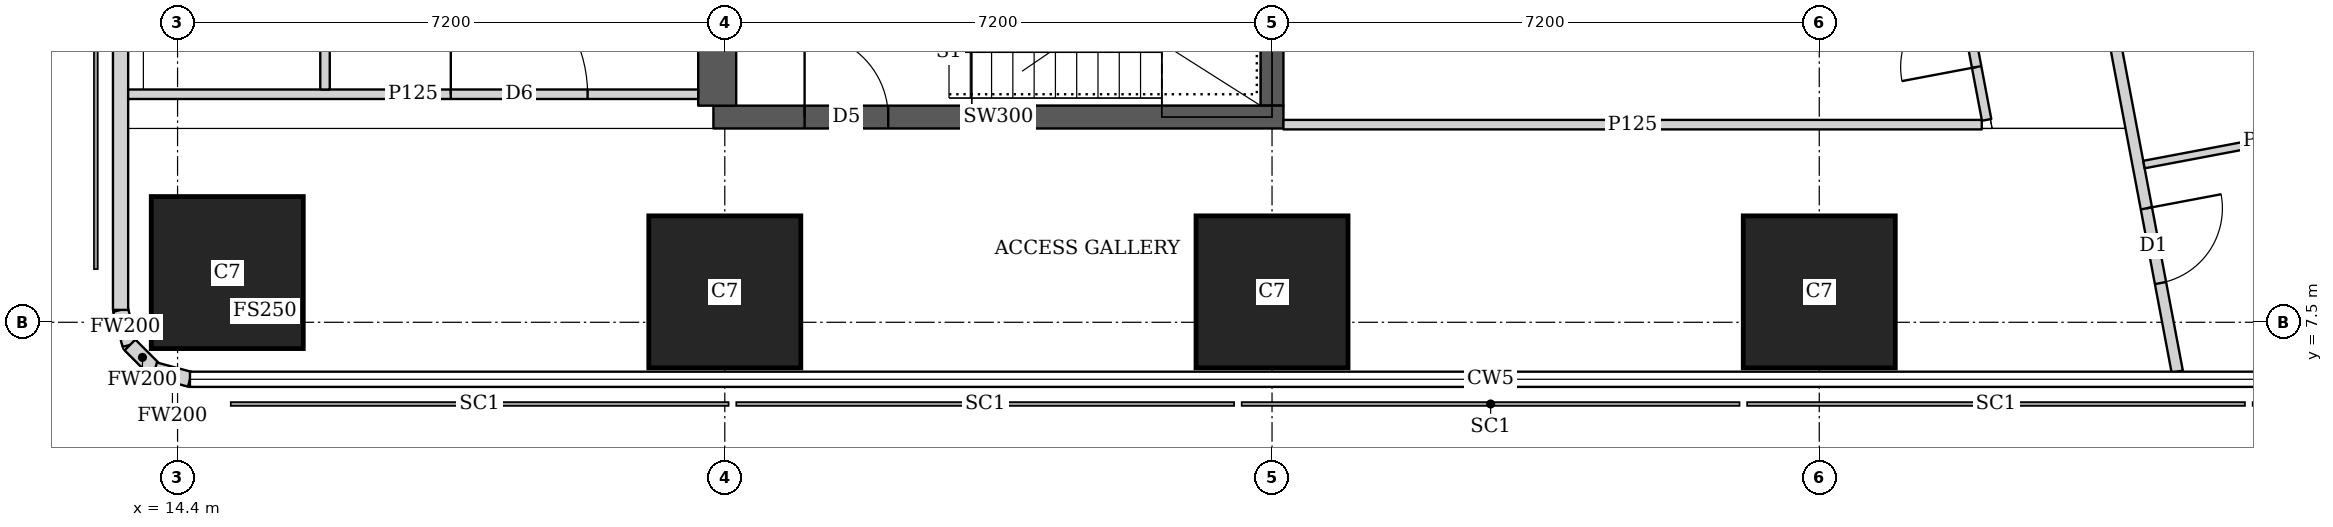
"""IFC4 building model, lengths in metres.
Left out: names, types, materials, properties, quantities, classifications, styles, units other than length and angle.
Written with IfcOpenShell. Run it as: python <this file> out.ifc"""

import sys

from ifc_helpers import new_model, si_unit, direction, frame, frame_2d, origin, origin_2d, place, context, subcontext, project, spatial, rectangle, extrude, element, fill, save


model = new_model("IFC4")
c1 = context("Model", 3, precision=1e-05, world=origin(), true_north=direction((0.0, 1.0)))
c2 = subcontext(c1, "Body", "Model", "MODEL_VIEW")
j1 = project(units=[si_unit("LENGTHUNIT", "METRE"), si_unit("PLANEANGLEUNIT", "RADIAN")], contexts=[c1])
p1 = place(None, origin())
s1 = spatial("IfcSite", under=j1, at=p1, CompositionType="ELEMENT")
p2 = place(p1, origin())
s2 = spatial("IfcBuilding", under=s1, at=p2, CompositionType="ELEMENT")
p3 = place(p2, frame((0.0, 0.0, 289.1)))
s3 = spatial("IfcBuildingStorey", under=s2, at=p3, CompositionType="ELEMENT", Elevation=289.1)
for number, where, z_axis, x_axis in (
    (1, (15.054, 8.154, 0.0), (0.0, 0.0, 1.0), (1.0, 0.0, 0.0)),
    (2, (21.6, 7.9, 0.0), (0.0, 0.0, 1.0), (1.0, 0.0, 0.0)),
    (3, (28.8, 7.9, 0.0), (0.0, 0.0, 1.0), (1.0, 0.0, 0.0)),
    (4, (36.0, 7.9, 0.0), (0.0, 0.0, 1.0), (1.0, 0.0, 0.0)),
):
    element("IfcColumn", number, at=place(p3, frame(where, z_axis=z_axis, x_axis=x_axis)), inside=s3, PredefinedType="COLUMN", context=c2, shape_type="SweptSolid", body=[
        extrude(rectangle(XDim=2.0, YDim=2.0, at=origin_2d()), origin(), (0.0, 0.0, 1.0), 3.75),
    ])
p4 = place(p3, frame((21.45, 10.2, 0.0), z_axis=(0.0, 0.0, 1.0), x_axis=(1.0, 0.0, 0.0)))
e5 = element("IfcWall", 5, at=p4, inside=s3, PredefinedType="SHEAR", context=c2, shape_type="SweptSolid", body=[
    extrude(rectangle(XDim=7.5, YDim=0.3, at=frame_2d((3.75, 0.0))), origin(), (0.0, 0.0, 1.0), 3.75),
])
p5 = place(p4, frame((1.2, 0.0, 0.0)))
e6 = element("IfcOpeningElement", 6, at=p5, cuts=e5, PredefinedType="OPENING", context=c2, shape_type="SweptSolid", body=[
    extrude(rectangle(XDim=1.1, YDim=2.1, at=frame_2d((0.55, 1.05))), frame((0.0, 0.16, 0.0), z_axis=(0.0, -1.0, 0.0), x_axis=(1.0, 0.0, 0.0)), (0.0, 0.0, 1.0), 0.32),
])
p6 = place(p3, frame((21.5, 10.35, 0.0), z_axis=(0.0, 0.0, 1.0), x_axis=(0.0, 1.0, 0.0)))
e7 = element("IfcWall", 7, at=p6, inside=s3, PredefinedType="SHEAR", context=c2, shape_type="SweptSolid", body=[
    extrude(rectangle(XDim=4.2, YDim=0.5, at=frame_2d((2.1, 0.0))), origin(), (0.0, 0.0, 1.0), 3.75),
])
p7 = place(p3, frame((28.8, 10.35, 0.0), z_axis=(0.0, 0.0, 1.0), x_axis=(0.0, 1.0, 0.0)))
e8 = element("IfcWall", 8, at=p7, inside=s3, PredefinedType="SHEAR", context=c2, shape_type="SweptSolid", body=[
    extrude(rectangle(XDim=4.2, YDim=0.3, at=frame_2d((2.1, 0.0))), origin(), (0.0, 0.0, 1.0), 3.75),
])
p8 = place(p3, frame((13.65, 43.037, 0.0), z_axis=(0.0, 0.0, 1.0), x_axis=(0.0, -1.0, 0.0)))
e9 = element("IfcWall", 9, at=p8, inside=s3, PredefinedType="SOLIDWALL", context=c2, shape_type="SweptSolid", body=[
    extrude(rectangle(XDim=35.374, YDim=0.2, at=frame_2d((17.687, 0.0))), origin(), (0.0, 0.0, 1.0), 3.5),
])
p9 = place(p3, frame((13.65, 7.663, 0.0), z_axis=(0.0, 0.0, 1.0), x_axis=(0.259698463175, -0.965689757751, 0.0)))
e10 = element("IfcWall", 10, at=p9, inside=s3, PredefinedType="SOLIDWALL", context=c2, shape_type="SweptSolid", body=[
    extrude(rectangle(XDim=0.478, YDim=0.2, at=frame_2d((0.239, 0.0))), origin(), (0.0, 0.0, 1.0), 3.5),
])
p10 = place(p3, frame((13.774, 7.202, 0.0), z_axis=(0.0, 0.0, 1.0), x_axis=(0.707369890659, -0.706843573776, 0.0)))
e11 = element("IfcWall", 11, at=p10, inside=s3, PredefinedType="SOLIDWALL", context=c2, shape_type="SweptSolid", body=[
    extrude(rectangle(XDim=0.464, YDim=0.2, at=frame_2d((0.232, 0.0))), origin(), (0.0, 0.0, 1.0), 3.5),
])
p11 = place(p3, frame((14.102, 6.874, 0.0), z_axis=(0.0, 0.0, 1.0), x_axis=(0.965655254015, -0.259826731483, 0.0)))
e12 = element("IfcWall", 12, at=p11, inside=s3, PredefinedType="SOLIDWALL", context=c2, shape_type="SweptSolid", body=[
    extrude(rectangle(XDim=0.477, YDim=0.2, at=frame_2d((0.239, 0.0))), origin(), (0.0, 0.0, 1.0), 3.5),
])
p12 = place(p3, frame((34.036, 42.186, 0.0), z_axis=(0.0, 0.0, 1.0), x_axis=(0.185593518645, -0.9826266055, 0.0)))
e13 = element("IfcWall", 13, at=p12, inside=s3, PredefinedType="SOLIDWALL", context=c2, shape_type="SweptSolid", body=[
    extrude(rectangle(XDim=35.961, YDim=0.15, at=frame_2d((17.98, 0.0))), origin(), (0.0, 0.0, 1.0), 2.5),
])
p13 = place(p12, frame((19.345, 0.0, 0.0)))
e14 = element("IfcOpeningElement", 14, at=p13, cuts=e13, PredefinedType="OPENING", context=c2, shape_type="SweptSolid", body=[
    extrude(rectangle(XDim=1.0, YDim=2.1, at=frame_2d((0.5, 1.05))), frame((0.0, 0.085, 0.0), z_axis=(0.0, -1.0, 0.0), x_axis=(1.0, 0.0, 0.0)), (0.0, 0.0, 1.0), 0.17),
])
p14 = place(p12, frame((33.774, 0.0, 0.0)))
e15 = element("IfcOpeningElement", 15, at=p14, cuts=e13, PredefinedType="OPENING", context=c2, shape_type="SweptSolid", body=[
    extrude(rectangle(XDim=1.0, YDim=2.1, at=frame_2d((0.5, 1.05))), frame((0.0, 0.085, 0.0), z_axis=(0.0, -1.0, 0.0), x_axis=(1.0, 0.0, 0.0)), (0.0, 0.0, 1.0), 0.17),
])
p15 = place(p3, frame((43.539, 10.192, 0.0), z_axis=(0.0, 0.0, 1.0), x_axis=(-0.982633623707, -0.185556356831, 0.0)))
e16 = element("IfcWall", 16, at=p15, inside=s3, PredefinedType="PARTITIONING", context=c2, shape_type="SweptSolid", body=[
    extrude(rectangle(XDim=3.325, YDim=0.1, at=frame_2d((1.663, 0.0))), origin(), (0.0, 0.0, 1.0), 3.5),
])
p16 = place(p3, frame((13.75, 10.5, 0.0), z_axis=(0.0, 0.0, 1.0), x_axis=(1.0, 0.0, 0.0)))
e17 = element("IfcWall", 17, at=p16, inside=s3, PredefinedType="PARTITIONING", context=c2, shape_type="SweptSolid", body=[
    extrude(rectangle(XDim=7.5, YDim=0.125, at=frame_2d((3.75, 0.0))), origin(), (0.0, 0.0, 1.0), 3.5),
])
p17 = place(p16, frame((4.245, 0.0, 0.0)))
e18 = element("IfcOpeningElement", 18, at=p17, cuts=e17, PredefinedType="OPENING", context=c2, shape_type="SweptSolid", body=[
    extrude(rectangle(XDim=1.8, YDim=2.1, at=frame_2d((0.9, 1.05))), frame((0.0, 0.073, 0.0), z_axis=(0.0, -1.0, 0.0), x_axis=(1.0, 0.0, 0.0)), (0.0, 0.0, 1.0), 0.145),
])
p18 = place(p3, frame((16.34, 10.562, 0.0), z_axis=(0.0, 0.0, 1.0), x_axis=(0.0, 1.0, 0.0)))
e19 = element("IfcWall", 19, at=p18, inside=s3, PredefinedType="PARTITIONING", context=c2, shape_type="SweptSolid", body=[
    extrude(rectangle(XDim=3.988, YDim=0.125, at=frame_2d((1.994, 0.0))), origin(), (0.0, 0.0, 1.0), 3.5),
])
p19 = place(p18, frame((1.438, 0.0, 0.0)))
e20 = element("IfcOpeningElement", 20, at=p19, cuts=e19, PredefinedType="OPENING", context=c2, shape_type="SweptSolid", body=[
    extrude(rectangle(XDim=1.0, YDim=2.1, at=frame_2d((0.5, 1.05))), frame((0.0, 0.073, 0.0), z_axis=(0.0, -1.0, 0.0), x_axis=(1.0, 0.0, 0.0)), (0.0, 0.0, 1.0), 0.145),
])
p20 = place(p3, frame((28.95, 10.1, 0.0), z_axis=(0.0, 0.0, 1.0), x_axis=(1.0, 0.0, 0.0)))
e21 = element("IfcWall", 21, at=p20, inside=s3, PredefinedType="PARTITIONING", context=c2, shape_type="SweptSolid", body=[
    extrude(rectangle(XDim=9.188, YDim=0.125, at=frame_2d((4.594, 0.0))), origin(), (0.0, 0.0, 1.0), 3.5),
])
p21 = place(p3, frame((38.202, 10.163, 0.0), z_axis=(0.0, 0.0, 1.0), x_axis=(-0.185641892853, 0.982617467593, 0.0)))
e22 = element("IfcWall", 22, at=p21, inside=s3, PredefinedType="PARTITIONING", context=c2, shape_type="SweptSolid", body=[
    extrude(rectangle(XDim=4.922, YDim=0.125, at=frame_2d((2.461, 0.0))), origin(), (0.0, 0.0, 1.0), 3.5),
])
p22 = place(p21, frame((0.708, 0.0, 0.0)))
e23 = element("IfcOpeningElement", 23, at=p22, cuts=e22, PredefinedType="OPENING", context=c2, shape_type="SweptSolid", body=[
    extrude(rectangle(XDim=1.0, YDim=2.1, at=frame_2d((0.5, 1.05))), frame((0.0, 0.073, 0.0), z_axis=(0.0, -1.0, 0.0), x_axis=(1.0, 0.0, 0.0)), (0.0, 0.0, 1.0), 0.145),
])
p23 = place(p14, origin())
e24 = element("IfcDoor", 24, at=p23, inside=s3, OperationType="SINGLE_SWING_LEFT", PredefinedType="DOOR", context=c2, shape_type="SweptSolid", body=[
    extrude(rectangle(XDim=1.0, YDim=2.1, at=frame_2d((0.5, 1.05))), frame((0.0, 0.025, 0.0), z_axis=(0.0, -1.0, 0.0), x_axis=(1.0, 0.0, 0.0)), (0.0, 0.0, 1.0), 0.05),
])
fill(e15, e24)
p24 = place(p17, origin())
e25 = element("IfcDoor", 25, at=p24, inside=s3, OperationType="DOUBLE_DOOR_SINGLE_SWING", PredefinedType="DOOR", context=c2, shape_type="SweptSolid", body=[
    extrude(rectangle(XDim=1.8, YDim=2.1, at=frame_2d((0.9, 1.05))), frame((0.0, 0.025, 0.0), z_axis=(0.0, -1.0, 0.0), x_axis=(1.0, 0.0, 0.0)), (0.0, 0.0, 1.0), 0.05),
])
fill(e18, e25)
p25 = place(p22, origin())
e26 = element("IfcDoor", 26, at=p25, inside=s3, OperationType="SINGLE_SWING_LEFT", PredefinedType="DOOR", context=c2, shape_type="SweptSolid", body=[
    extrude(rectangle(XDim=1.0, YDim=2.1, at=frame_2d((0.5, 1.05))), frame((0.0, 0.025, 0.0), z_axis=(0.0, -1.0, 0.0), x_axis=(1.0, 0.0, 0.0)), (0.0, 0.0, 1.0), 0.05),
])
fill(e23, e26)
p26 = place(p5, origin())
e27 = element("IfcDoor", 27, at=p26, inside=s3, OperationType="SINGLE_SWING_LEFT", PredefinedType="DOOR", context=c2, shape_type="SweptSolid", body=[
    extrude(rectangle(XDim=1.1, YDim=2.1, at=frame_2d((0.55, 1.05))), frame((0.0, 0.025, 0.0), z_axis=(0.0, -1.0, 0.0), x_axis=(1.0, 0.0, 0.0)), (0.0, 0.0, 1.0), 0.05),
])
fill(e6, e27)
save(model, sys.argv[1])
